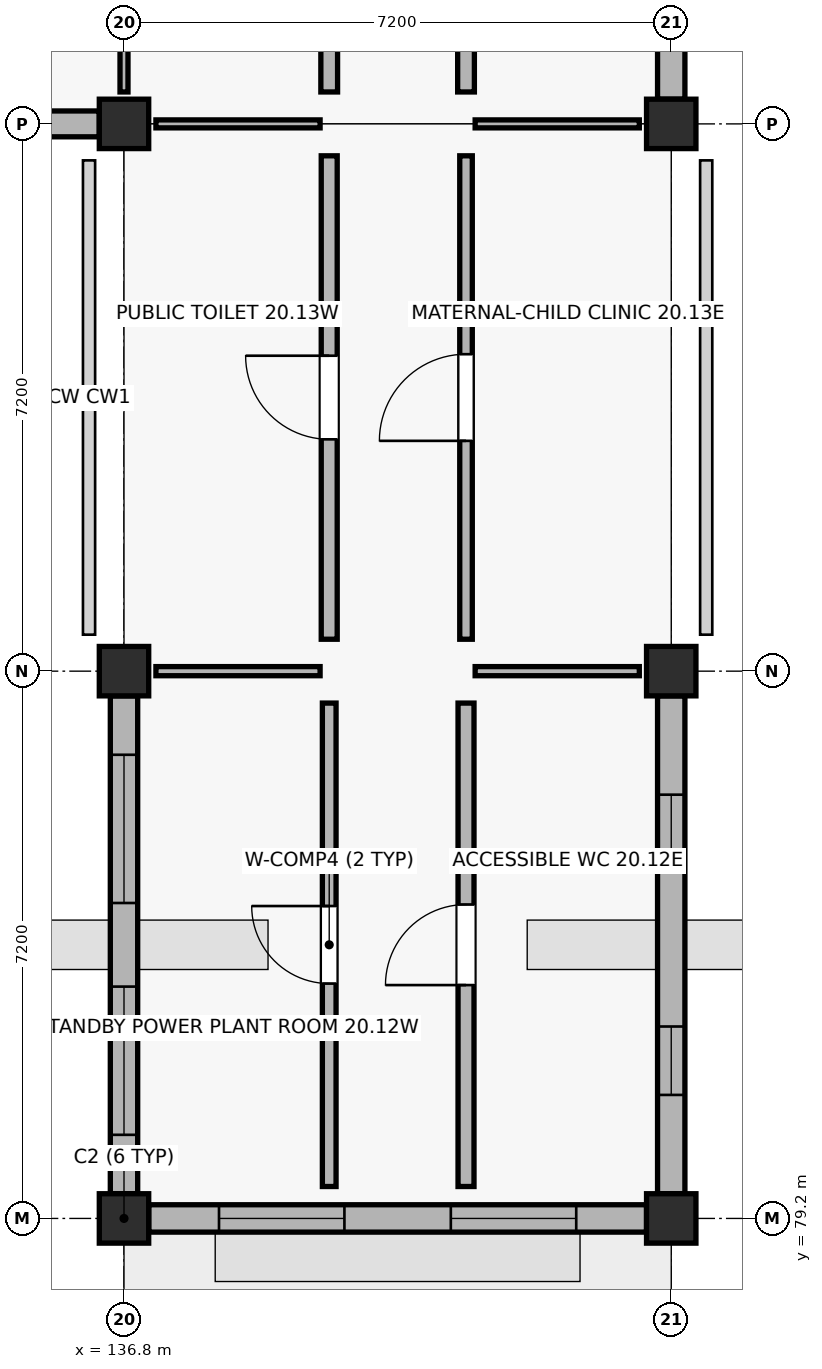
"""IFC4 building model, lengths in metres.
Left out: names, types, materials, properties, quantities, classifications, styles, units other than length and angle.
Written with IfcOpenShell. Run it as: python <this file> out.ifc"""

import sys

from ifc_helpers import new_model, si_unit, direction, frame, frame_2d, origin, origin_2d, place, context, subcontext, project, spatial, rectangle, extrude, element, fill, save


model = new_model("IFC4")
c1 = context("Model", 3, precision=1e-05, world=origin(), true_north=direction((0.0, 1.0)))
c2 = subcontext(c1, "Body", "Model", "MODEL_VIEW")
j1 = project(units=[si_unit("LENGTHUNIT", "METRE"), si_unit("PLANEANGLEUNIT", "RADIAN")], contexts=[c1])
p1 = place(None, origin())
s1 = spatial("IfcSite", under=j1, at=p1, CompositionType="ELEMENT")
p2 = place(p1, origin())
s2 = spatial("IfcBuilding", under=s1, at=p2, CompositionType="ELEMENT")
p3 = place(p2, origin())
s3 = spatial("IfcBuildingStorey", under=s2, at=p3, CompositionType="ELEMENT", Elevation=0.0)
for number, where, z_axis, x_axis in (
    (1, (136.8, 79.2, -0.25), (0.0, 0.0, 1.0), (1.0, 0.0, 0.0)),
    (2, (136.8, 86.4, -0.25), (0.0, 0.0, 1.0), (1.0, 0.0, 0.0)),
    (3, (136.8, 93.6, -0.25), (0.0, 0.0, 1.0), (1.0, 0.0, 0.0)),
    (4, (144.0, 79.2, -0.25), (0.0, 0.0, 1.0), (1.0, 0.0, 0.0)),
    (5, (144.0, 86.4, -0.25), (0.0, 0.0, 1.0), (1.0, 0.0, 0.0)),
    (6, (144.0, 93.6, -0.25), (0.0, 0.0, 1.0), (1.0, 0.0, 0.0)),
):
    element("IfcColumn", number, at=place(p3, frame(where, z_axis=z_axis, x_axis=x_axis)), inside=s3, PredefinedType="COLUMN", context=c2, shape_type="SweptSolid", body=[
        extrude(rectangle(XDim=0.65, YDim=0.65, at=origin_2d()), origin(), (0.0, 0.0, 1.0), 4.75),
    ])
p4 = place(p3, frame((129.875, 93.6, 0.0), z_axis=(0.0, 0.0, 1.0), x_axis=(1.0, 0.0, 0.0)))
e7 = element("IfcWall", 7, at=p4, inside=s3, PredefinedType="SOLIDWALL", context=c2, shape_type="SweptSolid", body=[
    extrude(rectangle(XDim=6.6, YDim=0.34, at=frame_2d((3.3, 0.0))), origin(), (0.0, 0.0, 1.0), 3.47),
])
p5 = place(p4, frame((1.3, 0.0, 0.9)))
e8 = element("IfcOpeningElement", 8, at=p5, cuts=e7, PredefinedType="OPENING", context=c2, shape_type="SweptSolid", body=[
    extrude(rectangle(XDim=0.9, YDim=1.88, at=frame_2d((0.45, 0.94))), frame((0.0, 0.18, 0.0), z_axis=(0.0, -1.0, 0.0), x_axis=(1.0, 0.0, 0.0)), (0.0, 0.0, 1.0), 0.36),
])
p6 = place(p4, frame((4.4, 0.0, 0.9)))
e9 = element("IfcOpeningElement", 9, at=p6, cuts=e7, PredefinedType="OPENING", context=c2, shape_type="SweptSolid", body=[
    extrude(rectangle(XDim=0.9, YDim=1.88, at=frame_2d((0.45, 0.94))), frame((0.0, 0.18, 0.0), z_axis=(0.0, -1.0, 0.0), x_axis=(1.0, 0.0, 0.0)), (0.0, 0.0, 1.0), 0.36),
])
p7 = place(p3, frame((137.125, 79.2, 0.0), z_axis=(0.0, 0.0, 1.0), x_axis=(1.0, 0.0, 0.0)))
e10 = element("IfcWall", 10, at=p7, inside=s3, PredefinedType="SOLIDWALL", context=c2, shape_type="SweptSolid", body=[
    extrude(rectangle(XDim=6.55, YDim=0.36, at=frame_2d((3.275, 0.0))), origin(), (0.0, 0.0, 1.0), 3.47),
])
p8 = place(p7, frame((0.925, 0.0, 0.9)))
e11 = element("IfcOpeningElement", 11, at=p8, cuts=e10, PredefinedType="OPENING", context=c2, shape_type="SweptSolid", body=[
    extrude(rectangle(XDim=1.65, YDim=1.88, at=frame_2d((0.825, 0.94))), frame((0.0, 0.19, 0.0), z_axis=(0.0, -1.0, 0.0), x_axis=(1.0, 0.0, 0.0)), (0.0, 0.0, 1.0), 0.38),
])
p9 = place(p7, frame((3.975, 0.0, 0.9)))
e12 = element("IfcOpeningElement", 12, at=p9, cuts=e10, PredefinedType="OPENING", context=c2, shape_type="SweptSolid", body=[
    extrude(rectangle(XDim=1.65, YDim=1.88, at=frame_2d((0.825, 0.94))), frame((0.0, 0.19, 0.0), z_axis=(0.0, -1.0, 0.0), x_axis=(1.0, 0.0, 0.0)), (0.0, 0.0, 1.0), 0.38),
])
p10 = place(p3, frame((136.8, 86.075, 0.0), z_axis=(0.0, 0.0, 1.0), x_axis=(0.0, -1.0, 0.0)))
e13 = element("IfcWall", 13, at=p10, inside=s3, PredefinedType="SOLIDWALL", context=c2, shape_type="SweptSolid", body=[
    extrude(rectangle(XDim=6.55, YDim=0.36, at=frame_2d((3.275, 0.0))), origin(), (0.0, 0.0, 1.0), 3.52),
])
p11 = place(p10, frame((0.775, 0.0, 0.9)))
e14 = element("IfcOpeningElement", 14, at=p11, cuts=e13, PredefinedType="OPENING", context=c2, shape_type="SweptSolid", body=[
    extrude(rectangle(XDim=1.95, YDim=1.88, at=frame_2d((0.975, 0.94))), frame((0.0, 0.19, 0.0), z_axis=(0.0, -1.0, 0.0), x_axis=(1.0, 0.0, 0.0)), (0.0, 0.0, 1.0), 0.38),
])
p12 = place(p10, frame((3.825, 0.0, 0.9)))
e15 = element("IfcOpeningElement", 15, at=p12, cuts=e13, PredefinedType="OPENING", context=c2, shape_type="SweptSolid", body=[
    extrude(rectangle(XDim=1.95, YDim=1.88, at=frame_2d((0.975, 0.94))), frame((0.0, 0.19, 0.0), z_axis=(0.0, -1.0, 0.0), x_axis=(1.0, 0.0, 0.0)), (0.0, 0.0, 1.0), 0.38),
])
p13 = place(p3, frame((144.0, 79.525, 0.0), z_axis=(0.0, 0.0, 1.0), x_axis=(0.0, 1.0, 0.0)))
e16 = element("IfcWall", 16, at=p13, inside=s3, PredefinedType="SOLIDWALL", context=c2, shape_type="SweptSolid", body=[
    extrude(rectangle(XDim=6.55, YDim=0.36, at=frame_2d((3.275, 0.0))), origin(), (0.0, 0.0, 1.0), 3.52),
])
p14 = place(p13, frame((1.3, 0.0, 0.9)))
e17 = element("IfcOpeningElement", 17, at=p14, cuts=e16, PredefinedType="OPENING", context=c2, shape_type="SweptSolid", body=[
    extrude(rectangle(XDim=0.9, YDim=1.25, at=frame_2d((0.45, 0.625))), frame((0.0, 0.19, 0.0), z_axis=(0.0, -1.0, 0.0), x_axis=(1.0, 0.0, 0.0)), (0.0, 0.0, 1.0), 0.38),
])
p15 = place(p13, frame((4.35, 0.0, 0.9)))
e18 = element("IfcOpeningElement", 18, at=p15, cuts=e16, PredefinedType="OPENING", context=c2, shape_type="SweptSolid", body=[
    extrude(rectangle(XDim=0.9, YDim=1.25, at=frame_2d((0.45, 0.625))), frame((0.0, 0.19, 0.0), z_axis=(0.0, -1.0, 0.0), x_axis=(1.0, 0.0, 0.0)), (0.0, 0.0, 1.0), 0.38),
])
p16 = place(p3, frame((144.0, 93.925, 0.0), z_axis=(0.0, 0.0, 1.0), x_axis=(0.0, 1.0, 0.0)))
e19 = element("IfcWall", 19, at=p16, inside=s3, PredefinedType="SOLIDWALL", context=c2, shape_type="SweptSolid", body=[
    extrude(rectangle(XDim=6.525, YDim=0.36, at=frame_2d((3.262, 0.0))), origin(), (0.0, 0.0, 1.0), 3.52),
])
p17 = place(p16, frame((1.0, 0.0, 0.9)))
e20 = element("IfcOpeningElement", 20, at=p17, cuts=e19, PredefinedType="OPENING", context=c2, shape_type="SweptSolid", body=[
    extrude(rectangle(XDim=1.5, YDim=1.25, at=frame_2d((0.75, 0.625))), frame((0.0, 0.19, 0.0), z_axis=(0.0, -1.0, 0.0), x_axis=(1.0, 0.0, 0.0)), (0.0, 0.0, 1.0), 0.38),
])
p18 = place(p16, frame((4.025, 0.0, 0.9)))
e21 = element("IfcOpeningElement", 21, at=p18, cuts=e19, PredefinedType="OPENING", context=c2, shape_type="SweptSolid", body=[
    extrude(rectangle(XDim=1.5, YDim=1.25, at=frame_2d((0.75, 0.625))), frame((0.0, 0.19, 0.0), z_axis=(0.0, -1.0, 0.0), x_axis=(1.0, 0.0, 0.0)), (0.0, 0.0, 1.0), 0.38),
])
p19 = place(p3, frame((136.8, 94.02, 0.0), z_axis=(0.0, 0.0, 1.0), x_axis=(0.0, 1.0, 0.0)))
e22 = element("IfcWall", 22, at=p19, inside=s3, PredefinedType="PARTITIONING", context=c2, shape_type="SweptSolid", body=[
    extrude(rectangle(XDim=2.16, YDim=0.105, at=frame_2d((1.08, 0.0))), origin(), (0.0, 0.0, 1.0), 3.36),
])
p20 = place(p3, frame((139.5, 79.62, 0.0), z_axis=(0.0, 0.0, 1.0), x_axis=(0.0, 1.0, 0.0)))
e23 = element("IfcWall", 23, at=p20, inside=s3, PredefinedType="PARTITIONING", context=c2, shape_type="SweptSolid", body=[
    extrude(rectangle(XDim=6.36, YDim=0.18, at=frame_2d((3.18, 0.0))), origin(), (0.0, 0.0, 1.0), 3.36),
])
p21 = place(p20, frame((2.67, 0.0, 0.0)))
e24 = element("IfcOpeningElement", 24, at=p21, cuts=e23, PredefinedType="OPENING", context=c2, shape_type="SweptSolid", body=[
    extrude(rectangle(XDim=1.02, YDim=2.19, at=frame_2d((0.51, 1.095))), frame((0.0, 0.1, 0.0), z_axis=(0.0, -1.0, 0.0), x_axis=(1.0, 0.0, 0.0)), (0.0, 0.0, 1.0), 0.2),
])
p22 = place(p3, frame((137.22, 86.4, 0.0), z_axis=(0.0, 0.0, 1.0), x_axis=(1.0, 0.0, 0.0)))
e25 = element("IfcWall", 25, at=p22, inside=s3, PredefinedType="PARTITIONING", context=c2, shape_type="SweptSolid", body=[
    extrude(rectangle(XDim=2.16, YDim=0.12, at=frame_2d((1.08, 0.0))), origin(), (0.0, 0.0, 1.0), 3.36),
])
p23 = place(p3, frame((141.3, 79.62, 0.0), z_axis=(0.0, 0.0, 1.0), x_axis=(0.0, 1.0, 0.0)))
e26 = element("IfcWall", 26, at=p23, inside=s3, PredefinedType="PLUMBINGWALL", context=c2, shape_type="SweptSolid", body=[
    extrude(rectangle(XDim=6.36, YDim=0.21, at=frame_2d((3.18, 0.0))), origin(), (0.0, 0.0, 1.0), 3.36),
])
p24 = place(p23, frame((2.65, 0.0, 0.0)))
e27 = element("IfcOpeningElement", 27, at=p24, cuts=e26, PredefinedType="OPENING", context=c2, shape_type="SweptSolid", body=[
    extrude(rectangle(XDim=1.06, YDim=2.19, at=frame_2d((0.53, 1.095))), frame((0.0, 0.115, 0.0), z_axis=(0.0, -1.0, 0.0), x_axis=(1.0, 0.0, 0.0)), (0.0, 0.0, 1.0), 0.23),
])
p25 = place(p3, frame((141.42, 86.4, 0.0), z_axis=(0.0, 0.0, 1.0), x_axis=(1.0, 0.0, 0.0)))
e28 = element("IfcWall", 28, at=p25, inside=s3, PredefinedType="PARTITIONING", context=c2, shape_type="SweptSolid", body=[
    extrude(rectangle(XDim=2.16, YDim=0.12, at=frame_2d((1.08, 0.0))), origin(), (0.0, 0.0, 1.0), 3.36),
])
p26 = place(p3, frame((139.5, 86.82, 0.0), z_axis=(0.0, 0.0, 1.0), x_axis=(0.0, 1.0, 0.0)))
e29 = element("IfcWall", 29, at=p26, inside=s3, PredefinedType="PLUMBINGWALL", context=c2, shape_type="SweptSolid", body=[
    extrude(rectangle(XDim=6.36, YDim=0.21, at=frame_2d((3.18, 0.0))), origin(), (0.0, 0.0, 1.0), 3.36),
])
p27 = place(p26, frame((2.63, 0.0, 0.0)))
e30 = element("IfcOpeningElement", 30, at=p27, cuts=e29, PredefinedType="OPENING", context=c2, shape_type="SweptSolid", body=[
    extrude(rectangle(XDim=1.1, YDim=2.19, at=frame_2d((0.55, 1.095))), frame((0.0, 0.115, 0.0), z_axis=(0.0, -1.0, 0.0), x_axis=(1.0, 0.0, 0.0)), (0.0, 0.0, 1.0), 0.23),
])
p28 = place(p3, frame((137.22, 93.6, 0.0), z_axis=(0.0, 0.0, 1.0), x_axis=(1.0, 0.0, 0.0)))
e31 = element("IfcWall", 31, at=p28, inside=s3, PredefinedType="PARTITIONING", context=c2, shape_type="SweptSolid", body=[
    extrude(rectangle(XDim=2.16, YDim=0.105, at=frame_2d((1.08, 0.0))), origin(), (0.0, 0.0, 1.0), 3.36),
])
p29 = place(p3, frame((141.3, 86.82, 0.0), z_axis=(0.0, 0.0, 1.0), x_axis=(0.0, 1.0, 0.0)))
e32 = element("IfcWall", 32, at=p29, inside=s3, PredefinedType="PARTITIONING", context=c2, shape_type="SweptSolid", body=[
    extrude(rectangle(XDim=6.36, YDim=0.165, at=frame_2d((3.18, 0.0))), origin(), (0.0, 0.0, 1.0), 3.36),
])
p30 = place(p29, frame((2.61, 0.0, 0.0)))
e33 = element("IfcOpeningElement", 33, at=p30, cuts=e32, PredefinedType="OPENING", context=c2, shape_type="SweptSolid", body=[
    extrude(rectangle(XDim=1.14, YDim=2.19, at=frame_2d((0.57, 1.095))), frame((0.0, 0.093, 0.0), z_axis=(0.0, -1.0, 0.0), x_axis=(1.0, 0.0, 0.0)), (0.0, 0.0, 1.0), 0.185),
])
p31 = place(p3, frame((141.42, 93.6, 0.0), z_axis=(0.0, 0.0, 1.0), x_axis=(1.0, 0.0, 0.0)))
e34 = element("IfcWall", 34, at=p31, inside=s3, PredefinedType="PARTITIONING", context=c2, shape_type="SweptSolid", body=[
    extrude(rectangle(XDim=2.16, YDim=0.105, at=frame_2d((1.08, 0.0))), origin(), (0.0, 0.0, 1.0), 3.36),
])
p32 = place(p3, frame((139.5, 94.02, 0.0), z_axis=(0.0, 0.0, 1.0), x_axis=(0.0, 1.0, 0.0)))
e35 = element("IfcWall", 35, at=p32, inside=s3, PredefinedType="SOLIDWALL", context=c2, shape_type="SweptSolid", body=[
    extrude(rectangle(XDim=6.36, YDim=0.22, at=frame_2d((3.18, 0.0))), origin(), (0.0, 0.0, 1.0), 3.36),
])
p33 = place(p32, frame((2.59, 0.0, 0.0)))
e36 = element("IfcOpeningElement", 36, at=p33, cuts=e35, PredefinedType="OPENING", context=c2, shape_type="SweptSolid", body=[
    extrude(rectangle(XDim=1.18, YDim=2.19, at=frame_2d((0.59, 1.095))), frame((0.0, 0.12, 0.0), z_axis=(0.0, -1.0, 0.0), x_axis=(1.0, 0.0, 0.0)), (0.0, 0.0, 1.0), 0.24),
])
p34 = place(p3, frame((141.3, 94.02, 0.0), z_axis=(0.0, 0.0, 1.0), x_axis=(0.0, 1.0, 0.0)))
e37 = element("IfcWall", 37, at=p34, inside=s3, PredefinedType="SOLIDWALL", context=c2, shape_type="SweptSolid", body=[
    extrude(rectangle(XDim=6.36, YDim=0.22, at=frame_2d((3.18, 0.0))), origin(), (0.0, 0.0, 1.0), 3.36),
])
p35 = place(p34, frame((2.57, 0.0, 0.0)))
e38 = element("IfcOpeningElement", 38, at=p35, cuts=e37, PredefinedType="OPENING", context=c2, shape_type="SweptSolid", body=[
    extrude(rectangle(XDim=1.22, YDim=2.19, at=frame_2d((0.61, 1.095))), frame((0.0, 0.12, 0.0), z_axis=(0.0, -1.0, 0.0), x_axis=(1.0, 0.0, 0.0)), (0.0, 0.0, 1.0), 0.24),
])
p36 = place(p8, origin())
e39 = element("IfcWindow", 39, at=p36, inside=s3, PartitioningType="SINGLE_PANEL", PredefinedType="WINDOW", context=c2, shape_type="SweptSolid", body=[
    extrude(rectangle(XDim=1.65, YDim=1.88, at=frame_2d((0.825, 0.94))), frame((0.0, 0.03, 0.0), z_axis=(0.0, -1.0, 0.0), x_axis=(1.0, 0.0, 0.0)), (0.0, 0.0, 1.0), 0.06),
])
fill(e11, e39)
p37 = place(p9, origin())
e40 = element("IfcWindow", 40, at=p37, inside=s3, PartitioningType="SINGLE_PANEL", PredefinedType="WINDOW", context=c2, shape_type="SweptSolid", body=[
    extrude(rectangle(XDim=1.65, YDim=1.88, at=frame_2d((0.825, 0.94))), frame((0.0, 0.03, 0.0), z_axis=(0.0, -1.0, 0.0), x_axis=(1.0, 0.0, 0.0)), (0.0, 0.0, 1.0), 0.06),
])
fill(e12, e40)
p38 = place(p11, origin())
e41 = element("IfcWindow", 41, at=p38, inside=s3, PartitioningType="SINGLE_PANEL", PredefinedType="WINDOW", context=c2, shape_type="SweptSolid", body=[
    extrude(rectangle(XDim=1.95, YDim=1.88, at=frame_2d((0.975, 0.94))), frame((0.0, 0.03, 0.0), z_axis=(0.0, -1.0, 0.0), x_axis=(1.0, 0.0, 0.0)), (0.0, 0.0, 1.0), 0.06),
])
fill(e14, e41)
p39 = place(p12, origin())
e42 = element("IfcWindow", 42, at=p39, inside=s3, PartitioningType="SINGLE_PANEL", PredefinedType="WINDOW", context=c2, shape_type="SweptSolid", body=[
    extrude(rectangle(XDim=1.95, YDim=1.88, at=frame_2d((0.975, 0.94))), frame((0.0, 0.03, 0.0), z_axis=(0.0, -1.0, 0.0), x_axis=(1.0, 0.0, 0.0)), (0.0, 0.0, 1.0), 0.06),
])
fill(e15, e42)
p40 = place(p14, origin())
e43 = element("IfcWindow", 43, at=p40, inside=s3, PartitioningType="SINGLE_PANEL", PredefinedType="WINDOW", context=c2, shape_type="SweptSolid", body=[
    extrude(rectangle(XDim=0.9, YDim=1.25, at=frame_2d((0.45, 0.625))), frame((0.0, 0.03, 0.0), z_axis=(0.0, -1.0, 0.0), x_axis=(1.0, 0.0, 0.0)), (0.0, 0.0, 1.0), 0.06),
])
fill(e17, e43)
p41 = place(p15, origin())
e44 = element("IfcWindow", 44, at=p41, inside=s3, PartitioningType="SINGLE_PANEL", PredefinedType="WINDOW", context=c2, shape_type="SweptSolid", body=[
    extrude(rectangle(XDim=0.9, YDim=1.25, at=frame_2d((0.45, 0.625))), frame((0.0, 0.03, 0.0), z_axis=(0.0, -1.0, 0.0), x_axis=(1.0, 0.0, 0.0)), (0.0, 0.0, 1.0), 0.06),
])
fill(e18, e44)
p42 = place(p21, origin())
e45 = element("IfcDoor", 45, at=p42, inside=s3, OperationType="SINGLE_SWING_RIGHT", PredefinedType="DOOR", context=c2, shape_type="SweptSolid", body=[
    extrude(rectangle(XDim=1.02, YDim=2.19, at=frame_2d((0.51, 1.095))), frame((0.0, 0.025, 0.0), z_axis=(0.0, -1.0, 0.0), x_axis=(1.0, 0.0, 0.0)), (0.0, 0.0, 1.0), 0.05),
])
fill(e24, e45)
p43 = place(p24, origin())
e46 = element("IfcDoor", 46, at=p43, inside=s3, OperationType="SINGLE_SWING_LEFT", PredefinedType="DOOR", context=c2, shape_type="SweptSolid", body=[
    extrude(rectangle(XDim=1.06, YDim=2.19, at=frame_2d((0.53, 1.095))), frame((0.0, 0.025, 0.0), z_axis=(0.0, -1.0, 0.0), x_axis=(1.0, 0.0, 0.0)), (0.0, 0.0, 1.0), 0.05),
])
fill(e27, e46)
p44 = place(p27, origin())
e47 = element("IfcDoor", 47, at=p44, inside=s3, OperationType="SINGLE_SWING_RIGHT", PredefinedType="DOOR", context=c2, shape_type="SweptSolid", body=[
    extrude(rectangle(XDim=1.1, YDim=2.19, at=frame_2d((0.55, 1.095))), frame((0.0, 0.025, 0.0), z_axis=(0.0, -1.0, 0.0), x_axis=(1.0, 0.0, 0.0)), (0.0, 0.0, 1.0), 0.05),
])
fill(e30, e47)
p45 = place(p30, origin())
e48 = element("IfcDoor", 48, at=p45, inside=s3, OperationType="SINGLE_SWING_LEFT", PredefinedType="DOOR", context=c2, shape_type="SweptSolid", body=[
    extrude(rectangle(XDim=1.14, YDim=2.19, at=frame_2d((0.57, 1.095))), frame((0.0, 0.025, 0.0), z_axis=(0.0, -1.0, 0.0), x_axis=(1.0, 0.0, 0.0)), (0.0, 0.0, 1.0), 0.05),
])
fill(e33, e48)
save(model, sys.argv[1])
